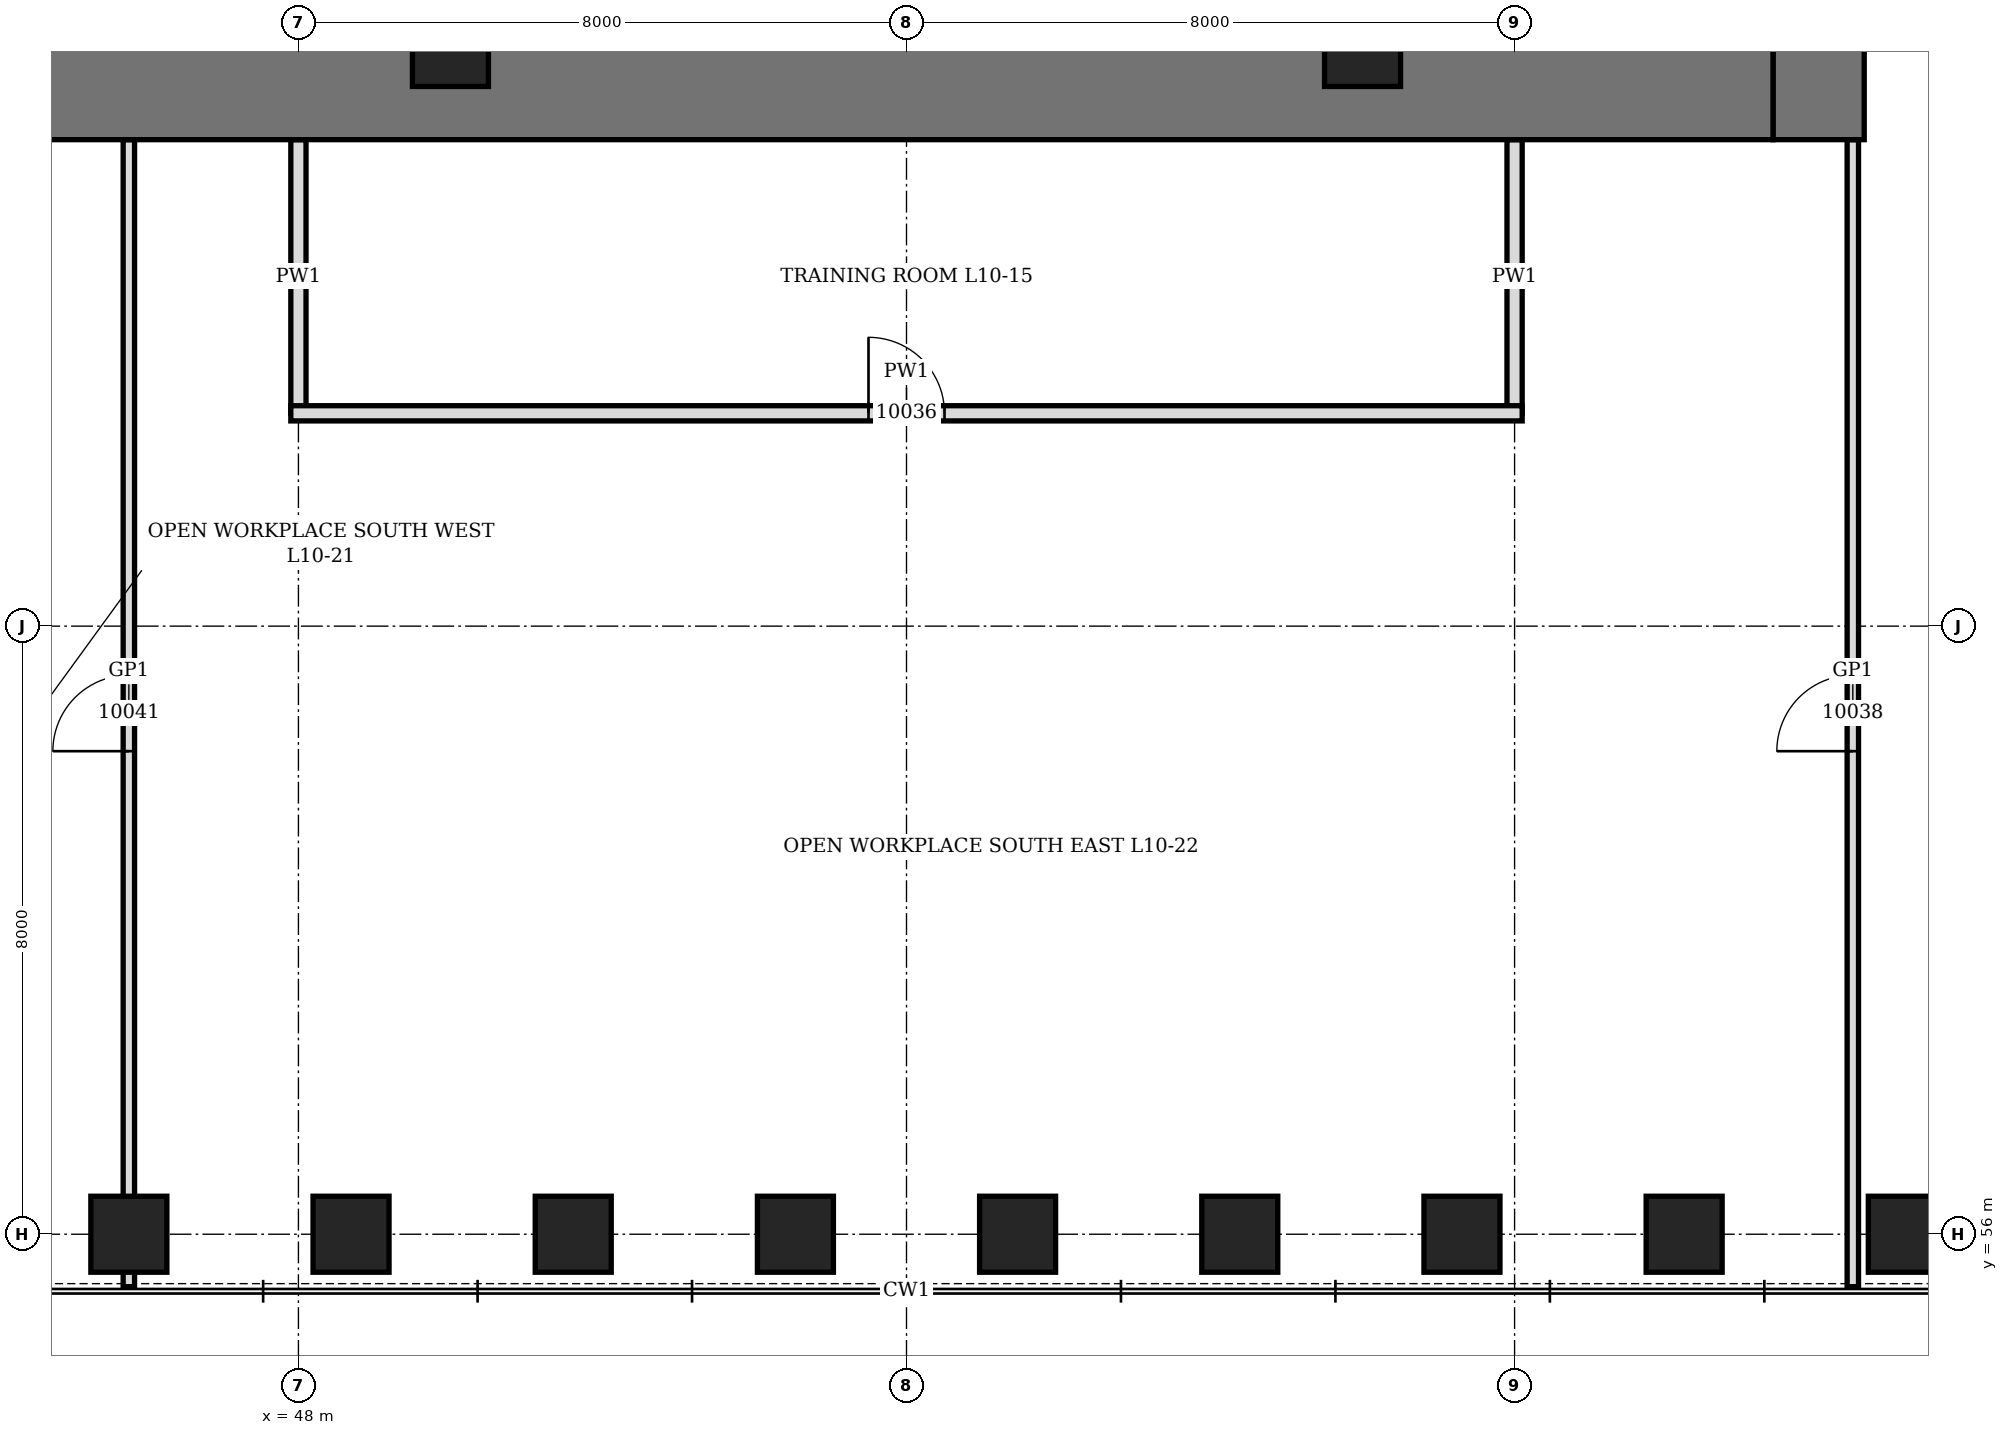
"""IFC4 building model, lengths in metres.
Left out: names, types, materials, properties, quantities, classifications, styles, units other than length and angle.
Written with IfcOpenShell. Run it as: python <this file> out.ifc"""

import sys

from ifc_helpers import new_model, si_unit, direction, frame, frame_2d, origin, origin_2d, place, context, subcontext, project, spatial, rectangle, hollow_rectangle, extrude, element, fill, save


model = new_model("IFC4")
c1 = context("Model", 3, precision=1e-05, world=origin(), true_north=direction((0.0, 1.0)))
c2 = subcontext(c1, "Body", "Model", "MODEL_VIEW")
j1 = project(units=[si_unit("LENGTHUNIT", "METRE"), si_unit("PLANEANGLEUNIT", "RADIAN")], contexts=[c1])
p1 = place(None, origin())
s1 = spatial("IfcSite", under=j1, at=p1, CompositionType="ELEMENT")
p2 = place(p1, origin())
s2 = spatial("IfcBuilding", under=s1, at=p2, CompositionType="ELEMENT")
p3 = place(p2, frame((0.0, 0.0, 51.7)))
s3 = spatial("IfcBuildingStorey", under=s2, at=p3, CompositionType="ELEMENT", Elevation=51.7)
for number, where, z_axis, x_axis in (
    (1, (45.769, 56.0, 0.0), (0.0, 0.0, 1.0), (1.0, 0.0, 0.0)),
    (2, (48.692, 56.0, 0.0), (0.0, 0.0, 1.0), (1.0, 0.0, 0.0)),
    (3, (51.615, 56.0, 0.0), (0.0, 0.0, 1.0), (1.0, 0.0, 0.0)),
    (4, (54.539, 56.0, 0.0), (0.0, 0.0, 1.0), (1.0, 0.0, 0.0)),
    (5, (57.461, 56.0, 0.0), (0.0, 0.0, 1.0), (1.0, 0.0, 0.0)),
    (6, (60.385, 56.0, 0.0), (0.0, 0.0, 1.0), (1.0, 0.0, 0.0)),
    (7, (63.308, 56.0, 0.0), (0.0, 0.0, 1.0), (1.0, 0.0, 0.0)),
    (8, (66.231, 56.0, 0.0), (0.0, 0.0, 1.0), (1.0, 0.0, 0.0)),
    (9, (69.154, 56.0, 0.0), (0.0, 0.0, 1.0), (1.0, 0.0, 0.0)),
):
    element("IfcColumn", number, at=place(p3, frame(where, z_axis=z_axis, x_axis=x_axis)), inside=s3, PredefinedType="COLUMN", context=c2, shape_type="SweptSolid", body=[
        extrude(hollow_rectangle(XDim=1.0, YDim=1.0, WallThickness=0.25, at=origin_2d()), origin(), (0.0, 0.0, 1.0), 4.2),
    ])
p4 = place(p3, frame((68.0, 70.4, 0.0), z_axis=(0.0, 0.0, 1.0), x_axis=(0.0, 1.0, 0.0)))
e10 = element("IfcWall", 10, at=p4, inside=s3, PredefinedType="SHEAR", context=c2, shape_type="SweptSolid", body=[
    extrude(rectangle(XDim=19.2, YDim=1.2, at=frame_2d((9.6, 0.0))), origin(), (0.0, 0.0, 1.0), 4.2),
])
p5 = place(p4, frame((8.6, 0.0, 0.0)))
e11 = element("IfcOpeningElement", 11, at=p5, cuts=e10, PredefinedType="OPENING", context=c2, shape_type="SweptSolid", body=[
    extrude(rectangle(XDim=2.0, YDim=2.4, at=frame_2d((1.0, 1.2))), frame((0.0, 0.61, 0.0), z_axis=(0.0, -1.0, 0.0), x_axis=(1.0, 0.0, 0.0)), (0.0, 0.0, 1.0), 1.22),
])
p6 = place(p3, frame((44.6, 71.0, 0.0), z_axis=(0.0, 0.0, 1.0), x_axis=(1.0, 0.0, 0.0)))
e12 = element("IfcWall", 12, at=p6, inside=s3, PredefinedType="SHEAR", context=c2, shape_type="SweptSolid", body=[
    extrude(rectangle(XDim=22.8, YDim=1.2, at=frame_2d((11.4, 0.0))), origin(), (0.0, 0.0, 1.0), 4.2),
])
for number, where, z_axis, x_axis in (
    (13, (50.0, 71.6, 0.0), (0.0, 0.0, 1.0), (1.0, 0.0, 0.0)),
    (14, (62.0, 71.6, 0.0), (0.0, 0.0, 1.0), (1.0, 0.0, 0.0)),
):
    element("IfcColumn", number, at=place(p3, frame(where, z_axis=z_axis, x_axis=x_axis)), inside=s3, PredefinedType="COLUMN", context=c2, shape_type="SweptSolid", body=[
        extrude(hollow_rectangle(XDim=1.0, YDim=1.0, WallThickness=0.15, at=origin_2d()), origin(), (0.0, 0.0, 1.0), 4.2),
    ])
for number, where, z_axis, x_axis in (
    (15, (48.0, 66.8, 0.0), (0.0, 0.0, 1.0), (0.0, 1.0, 0.0)),
    (16, (64.0, 66.8, 0.0), (0.0, 0.0, 1.0), (0.0, 1.0, 0.0)),
):
    element("IfcWall", number, at=place(p3, frame(where, z_axis=z_axis, x_axis=x_axis)), inside=s3, PredefinedType="PARTITIONING", context=c2, shape_type="SweptSolid", body=[
        extrude(rectangle(XDim=3.6, YDim=0.2, at=frame_2d((1.8, 0.0))), origin(), (0.0, 0.0, 1.0), 4.04),
    ])
p7 = place(p3, frame((47.9, 66.8, 0.0), z_axis=(0.0, 0.0, 1.0), x_axis=(1.0, 0.0, 0.0)))
e17 = element("IfcWall", 17, at=p7, inside=s3, PredefinedType="PARTITIONING", context=c2, shape_type="SweptSolid", body=[
    extrude(rectangle(XDim=16.2, YDim=0.2, at=frame_2d((8.1, 0.0))), origin(), (0.0, 0.0, 1.0), 4.04),
])
p8 = place(p7, frame((7.6, 0.0, 0.0)))
e18 = element("IfcOpeningElement", 18, at=p8, cuts=e17, PredefinedType="OPENING", context=c2, shape_type="SweptSolid", body=[
    extrude(rectangle(XDim=1.0, YDim=2.1, at=frame_2d((0.5, 1.05))), frame((0.0, 0.11, 0.0), z_axis=(0.0, -1.0, 0.0), x_axis=(1.0, 0.0, 0.0)), (0.0, 0.0, 1.0), 0.22),
])
p9 = place(p3, frame((45.769, 55.31, 0.0), z_axis=(0.0, 0.0, 1.0), x_axis=(0.0, 1.0, 0.0)))
e19 = element("IfcWall", 19, at=p9, inside=s3, PredefinedType="PARTITIONING", context=c2, shape_type="SweptSolid", body=[
    extrude(rectangle(XDim=15.09, YDim=0.15, at=frame_2d((7.545, 0.0))), origin(), (0.0, 0.0, 1.0), 3.278),
])
p10 = place(p9, frame((7.045, 0.0, 0.0)))
e20 = element("IfcOpeningElement", 20, at=p10, cuts=e19, PredefinedType="OPENING", context=c2, shape_type="SweptSolid", body=[
    extrude(rectangle(XDim=1.0, YDim=2.4, at=frame_2d((0.5, 1.2))), frame((0.0, 0.085, 0.0), z_axis=(0.0, -1.0, 0.0), x_axis=(1.0, 0.0, 0.0)), (0.0, 0.0, 1.0), 0.17),
])
p11 = place(p3, frame((68.45, 55.31, 0.0), z_axis=(0.0, 0.0, 1.0), x_axis=(0.0, 1.0, 0.0)))
e21 = element("IfcWall", 21, at=p11, inside=s3, PredefinedType="PARTITIONING", context=c2, shape_type="SweptSolid", body=[
    extrude(rectangle(XDim=15.09, YDim=0.15, at=frame_2d((7.545, 0.0))), origin(), (0.0, 0.0, 1.0), 4.04),
])
p12 = place(p11, frame((7.045, 0.0, 0.0)))
e22 = element("IfcOpeningElement", 22, at=p12, cuts=e21, PredefinedType="OPENING", context=c2, shape_type="SweptSolid", body=[
    extrude(rectangle(XDim=1.0, YDim=2.4, at=frame_2d((0.5, 1.2))), frame((0.0, 0.085, 0.0), z_axis=(0.0, -1.0, 0.0), x_axis=(1.0, 0.0, 0.0)), (0.0, 0.0, 1.0), 0.17),
])
p13 = place(p8, origin())
e23 = element("IfcDoor", 23, at=p13, inside=s3, OperationType="SINGLE_SWING_LEFT", PredefinedType="DOOR", context=c2, shape_type="SweptSolid", body=[
    extrude(rectangle(XDim=1.0, YDim=2.1, at=frame_2d((0.5, 1.05))), frame((0.0, 0.1, 0.0), z_axis=(0.0, -1.0, 0.0), x_axis=(1.0, 0.0, 0.0)), (0.0, 0.0, 1.0), 0.199),
])
fill(e18, e23)
p14 = place(p12, origin())
e24 = element("IfcDoor", 24, at=p14, inside=s3, OperationType="SINGLE_SWING_RIGHT", PredefinedType="DOOR", context=c2, shape_type="SweptSolid", body=[
    extrude(rectangle(XDim=1.0, YDim=2.4, at=frame_2d((0.5, 1.2))), frame((0.0, 0.075, 0.0), z_axis=(0.0, -1.0, 0.0), x_axis=(1.0, 0.0, 0.0)), (0.0, 0.0, 1.0), 0.149),
])
fill(e22, e24)
p15 = place(p10, origin())
e25 = element("IfcDoor", 25, at=p15, inside=s3, OperationType="SINGLE_SWING_RIGHT", PredefinedType="DOOR", context=c2, shape_type="SweptSolid", body=[
    extrude(rectangle(XDim=1.0, YDim=2.4, at=frame_2d((0.5, 1.2))), frame((0.0, 0.075, 0.0), z_axis=(0.0, -1.0, 0.0), x_axis=(1.0, 0.0, 0.0)), (0.0, 0.0, 1.0), 0.149),
])
fill(e20, e25)
save(model, sys.argv[1])
